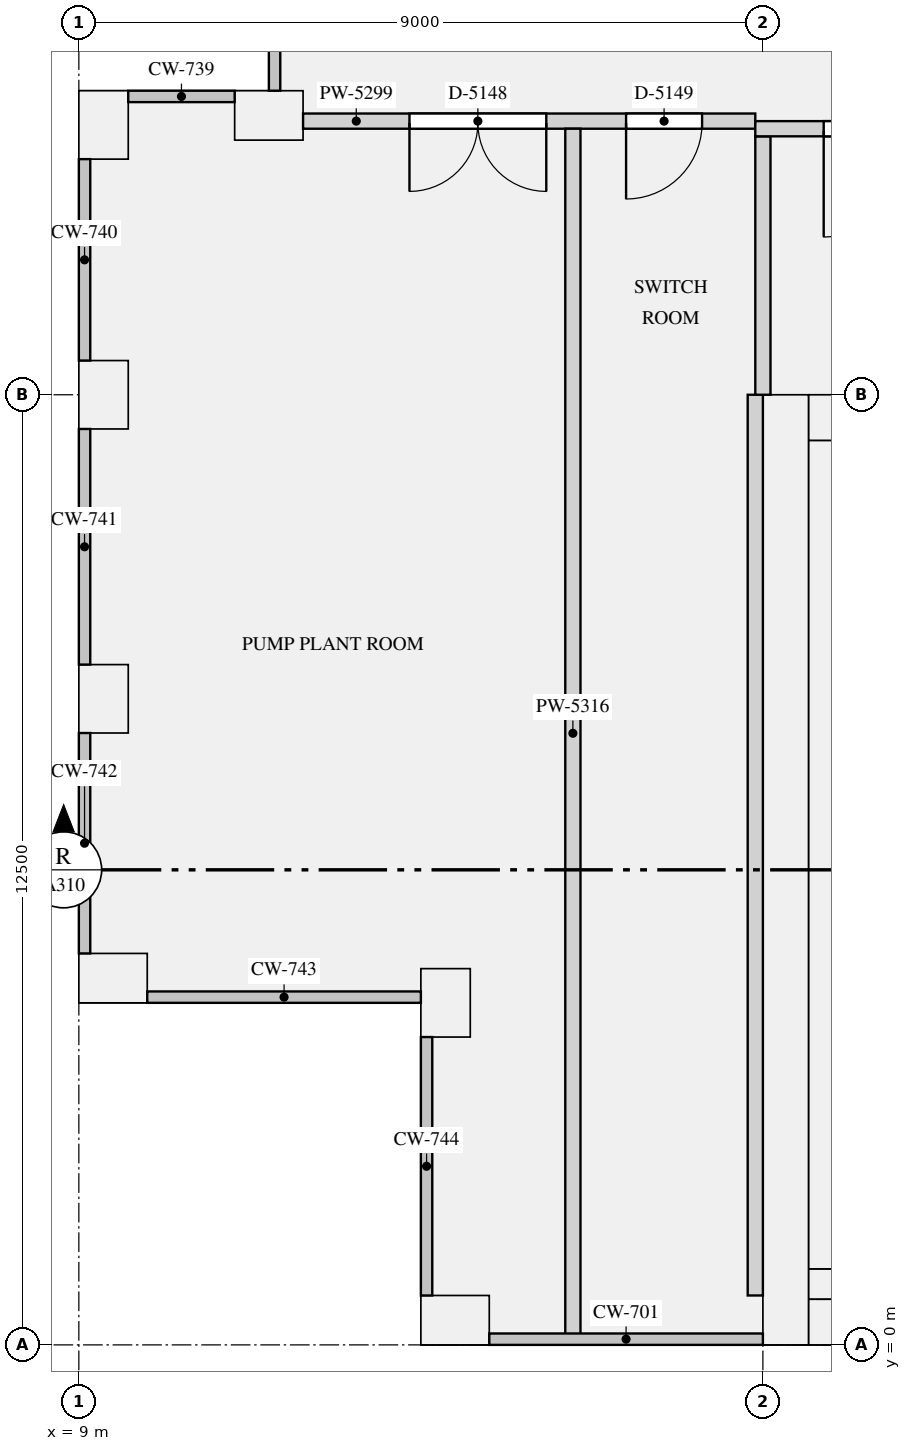
"""IFC4 building model, lengths in metres.
Left out: names, types, materials, properties, quantities, classifications, styles, units other than length and angle.
Written with IfcOpenShell. Run it as: python <this file> out.ifc"""

import sys

from ifc_helpers import new_model, si_unit, direction, frame, frame_2d, origin, origin_2d, place, context, subcontext, project, spatial, rectangle, extrude, element, fill, save


model = new_model("IFC4")
c1 = context("Model", 3, precision=1e-05, world=origin(), true_north=direction((0.0, 1.0)))
c2 = subcontext(c1, "Body", "Model", "MODEL_VIEW")
j1 = project(units=[si_unit("LENGTHUNIT", "METRE"), si_unit("PLANEANGLEUNIT", "RADIAN")], contexts=[c1])
p1 = place(None, origin())
s1 = spatial("IfcSite", under=j1, at=p1, CompositionType="ELEMENT")
p2 = place(p1, origin())
s2 = spatial("IfcBuilding", under=s1, at=p2, CompositionType="ELEMENT")
p3 = place(p2, frame((0.0, 0.0, 235.8)))
s3 = spatial("IfcBuildingStorey", under=s2, at=p3, CompositionType="ELEMENT", Elevation=235.8)
for number, where, z_axis, x_axis in (
    (1, (13.95, 0.325, 0.0), (0.0, 0.0, 1.0), (1.0, 0.0, 0.0)),
    (2, (11.5, 16.175, 0.0), (0.0, 0.0, 1.0), (-1.0, 0.0, 0.0)),
    (3, (9.325, 16.05, 0.0), (0.0, 0.0, 1.0), (0.0, -1.0, 0.0)),
    (4, (9.325, 12.5, 0.0), (0.0, 0.0, 1.0), (0.0, -1.0, 0.0)),
    (5, (9.325, 8.5, 0.0), (0.0, 0.0, 1.0), (0.0, -1.0, 0.0)),
    (6, (9.45, 4.825, 0.0), (0.0, 0.0, 1.0), (1.0, 0.0, 0.0)),
    (7, (13.825, 4.5, 0.0), (0.0, 0.0, 1.0), (0.0, -1.0, 0.0)),
):
    element("IfcColumn", number, at=place(p3, frame(where, z_axis=z_axis, x_axis=x_axis)), inside=s3, PredefinedType="USERDEFINED", context=c2, shape_type="SweptSolid", body=[
        extrude(rectangle(XDim=0.9, YDim=0.65, at=origin_2d()), origin(), (0.0, 0.0, 1.0), 4.2),
    ])
p4 = place(p3, frame((18.3, 0.0, 0.0), z_axis=(0.0, 0.0, 1.0), x_axis=(0.0, 1.0, 0.0)))
e8 = element("IfcWall", 8, at=p4, inside=s3, PredefinedType="SHEAR", context=c2, shape_type="SweptSolid", body=[
    extrude(rectangle(XDim=12.5, YDim=0.6, at=frame_2d((6.25, 0.0))), origin(), (0.0, 0.0, 1.0), 4.2),
])
p5 = place(p3, frame((18.6, 0.3, 0.0), z_axis=(0.0, 0.0, 1.0), x_axis=(1.0, 0.0, 0.0)))
e9 = element("IfcWall", 9, at=p5, inside=s3, PredefinedType="SHEAR", context=c2, shape_type="SweptSolid", body=[
    extrude(rectangle(XDim=34.8, YDim=0.6, at=frame_2d((17.4, 0.0))), origin(), (0.0, 0.0, 1.0), 4.2),
])
p6 = place(p3, frame((18.6, 12.2, 0.0), z_axis=(0.0, 0.0, 1.0), x_axis=(1.0, 0.0, 0.0)))
e10 = element("IfcWall", 10, at=p6, inside=s3, PredefinedType="SHEAR", context=c2, shape_type="SweptSolid", body=[
    extrude(rectangle(XDim=34.8, YDim=0.6, at=frame_2d((17.4, 0.0))), origin(), (0.0, 0.0, 1.0), 4.2),
])
p7 = place(p6, frame((24.575, 0.0, 0.0)))
e11 = element("IfcOpeningElement", 11, at=p7, cuts=e10, PredefinedType="OPENING", context=c2, shape_type="SweptSolid", body=[
    extrude(rectangle(XDim=1.1, YDim=2.1, at=frame_2d((0.55, 1.05))), frame((0.0, 0.31, 0.0), z_axis=(0.0, -1.0, 0.0), x_axis=(1.0, 0.0, 0.0)), (0.0, 0.0, 1.0), 0.62),
])
p8 = place(p6, frame((26.825, 0.0, 0.0)))
e12 = element("IfcOpeningElement", 12, at=p8, cuts=e10, PredefinedType="OPENING", context=c2, shape_type="SweptSolid", body=[
    extrude(rectangle(XDim=1.1, YDim=2.1, at=frame_2d((0.55, 1.05))), frame((0.0, 0.31, 0.0), z_axis=(0.0, -1.0, 0.0), x_axis=(1.0, 0.0, 0.0)), (0.0, 0.0, 1.0), 0.62),
])
p9 = place(p6, frame((29.075, 0.0, 0.0)))
e13 = element("IfcOpeningElement", 13, at=p9, cuts=e10, PredefinedType="OPENING", context=c2, shape_type="SweptSolid", body=[
    extrude(rectangle(XDim=1.1, YDim=2.1, at=frame_2d((0.55, 1.05))), frame((0.0, 0.31, 0.0), z_axis=(0.0, -1.0, 0.0), x_axis=(1.0, 0.0, 0.0)), (0.0, 0.0, 1.0), 0.62),
])
p10 = place(p6, frame((18.6, 0.0, 0.0)))
e14 = element("IfcOpeningElement", 14, at=p10, cuts=e10, PredefinedType="OPENING", context=c2, shape_type="SweptSolid", body=[
    extrude(rectangle(XDim=0.9, YDim=2.1, at=frame_2d((0.45, 1.05))), frame((0.0, 0.31, 0.0), z_axis=(0.0, -1.0, 0.0), x_axis=(1.0, 0.0, 0.0)), (0.0, 0.0, 1.0), 0.62),
])
p11 = place(p6, frame((4.65, 0.0, 0.0)))
e15 = element("IfcOpeningElement", 15, at=p11, cuts=e10, PredefinedType="OPENING", context=c2, shape_type="SweptSolid", body=[
    extrude(rectangle(XDim=0.9, YDim=2.1, at=frame_2d((0.45, 1.05))), frame((0.0, 0.31, 0.0), z_axis=(0.0, -1.0, 0.0), x_axis=(1.0, 0.0, 0.0)), (0.0, 0.0, 1.0), 0.62),
])
p12 = place(p6, frame((1.55, 0.0, 0.0)))
e16 = element("IfcOpeningElement", 16, at=p12, cuts=e10, PredefinedType="OPENING", context=c2, shape_type="SweptSolid", body=[
    extrude(rectangle(XDim=1.2, YDim=2.1, at=frame_2d((0.6, 1.05))), frame((0.0, 0.31, 0.0), z_axis=(0.0, -1.0, 0.0), x_axis=(1.0, 0.0, 0.0)), (0.0, 0.0, 1.0), 0.62),
])
p13 = place(p6, frame((32.05, 0.0, 0.0)))
e17 = element("IfcOpeningElement", 17, at=p13, cuts=e10, PredefinedType="OPENING", context=c2, shape_type="SweptSolid", body=[
    extrude(rectangle(XDim=1.2, YDim=2.1, at=frame_2d((0.6, 1.05))), frame((0.0, 0.31, 0.0), z_axis=(0.0, -1.0, 0.0), x_axis=(1.0, 0.0, 0.0)), (0.0, 0.0, 1.0), 0.62),
])
p14 = place(p3, frame((18.8, 1.0, 0.0), z_axis=(0.0, 0.0, 1.0), x_axis=(0.0, 1.0, 0.0)))
e18 = element("IfcWall", 18, at=p14, inside=s3, PredefinedType="SHEAR", context=c2, shape_type="SweptSolid", body=[
    extrude(rectangle(XDim=10.9, YDim=0.4, at=frame_2d((5.45, 0.0))), origin(), (0.0, 0.0, 1.0), 4.2),
])
p15 = place(p3, frame((18.6, 0.8, 0.0), z_axis=(0.0, 0.0, 1.0), x_axis=(1.0, 0.0, 0.0)))
e19 = element("IfcWall", 19, at=p15, inside=s3, PredefinedType="SHEAR", context=c2, shape_type="SweptSolid", body=[
    extrude(rectangle(XDim=34.8, YDim=0.4, at=frame_2d((17.4, 0.0))), origin(), (0.0, 0.0, 1.0), 4.2),
])
p16 = place(p3, frame((18.0, 12.5, 0.0), z_axis=(0.0, 0.0, 1.0), x_axis=(0.0, 1.0, 0.0)))
e20 = element("IfcWall", 20, at=p16, inside=s3, PredefinedType="PARTITIONING", context=c2, shape_type="SweptSolid", body=[
    extrude(rectangle(XDim=3.4, YDim=0.2, at=frame_2d((1.7, 0.0))), origin(), (0.0, 0.0, 1.0), 3.85),
])
p17 = place(p3, frame((17.9, 16.0, 0.0), z_axis=(0.0, 0.0, 1.0), x_axis=(1.0, 0.0, 0.0)))
e21 = element("IfcWall", 21, at=p17, inside=s3, PredefinedType="PARTITIONING", context=c2, shape_type="SweptSolid", body=[
    extrude(rectangle(XDim=36.2, YDim=0.2, at=frame_2d((18.1, 0.0))), origin(), (0.0, 0.0, 1.0), 3.85),
])
p18 = place(p17, frame((0.9, 0.0, 0.0)))
e22 = element("IfcOpeningElement", 22, at=p18, cuts=e21, PredefinedType="OPENING", context=c2, shape_type="SweptSolid", body=[
    extrude(rectangle(XDim=1.4, YDim=2.1, at=frame_2d((0.7, 1.05))), frame((0.0, 0.11, 0.0), z_axis=(0.0, -1.0, 0.0), x_axis=(1.0, 0.0, 0.0)), (0.0, 0.0, 1.0), 0.22),
])
p19 = place(p17, frame((33.9, 0.0, 0.0)))
e23 = element("IfcOpeningElement", 23, at=p19, cuts=e21, PredefinedType="OPENING", context=c2, shape_type="SweptSolid", body=[
    extrude(rectangle(XDim=1.4, YDim=2.1, at=frame_2d((0.7, 1.05))), frame((0.0, 0.11, 0.0), z_axis=(0.0, -1.0, 0.0), x_axis=(1.0, 0.0, 0.0)), (0.0, 0.0, 1.0), 0.22),
])
p20 = place(p3, frame((11.95, 16.1, 0.0), z_axis=(0.0, 0.0, 1.0), x_axis=(1.0, 0.0, 0.0)))
e24 = element("IfcWall", 24, at=p20, inside=s3, PredefinedType="PARTITIONING", context=c2, shape_type="SweptSolid", body=[
    extrude(rectangle(XDim=5.95, YDim=0.2, at=frame_2d((2.975, 0.0))), origin(), (0.0, 0.0, 1.0), 3.85),
])
p21 = place(p20, frame((1.4, 0.0, 0.0)))
e25 = element("IfcOpeningElement", 25, at=p21, cuts=e24, PredefinedType="OPENING", context=c2, shape_type="SweptSolid", body=[
    extrude(rectangle(XDim=1.8, YDim=2.1, at=frame_2d((0.9, 1.05))), frame((0.0, 0.11, 0.0), z_axis=(0.0, -1.0, 0.0), x_axis=(1.0, 0.0, 0.0)), (0.0, 0.0, 1.0), 0.22),
])
p22 = place(p20, frame((4.25, 0.0, 0.0)))
e26 = element("IfcOpeningElement", 26, at=p22, cuts=e24, PredefinedType="OPENING", context=c2, shape_type="SweptSolid", body=[
    extrude(rectangle(XDim=1.0, YDim=2.1, at=frame_2d((0.5, 1.05))), frame((0.0, 0.11, 0.0), z_axis=(0.0, -1.0, 0.0), x_axis=(1.0, 0.0, 0.0)), (0.0, 0.0, 1.0), 0.22),
])
p23 = place(p3, frame((15.5, 0.093, 0.0), z_axis=(0.0, 0.0, 1.0), x_axis=(0.0, 1.0, 0.0)))
e27 = element("IfcWall", 27, at=p23, inside=s3, PredefinedType="PARTITIONING", context=c2, shape_type="SweptSolid", body=[
    extrude(rectangle(XDim=15.907, YDim=0.2, at=frame_2d((7.954, 0.0))), origin(), (0.0, 0.0, 1.0), 3.85),
])
p24 = place(p3, frame((17.9, 0.65, 0.0), z_axis=(0.0, 0.0, 1.0), x_axis=(0.0, 1.0, 0.0)))
e28 = element("IfcWall", 28, at=p24, inside=s3, PredefinedType="PARTITIONING", context=c2, shape_type="SweptSolid", body=[
    extrude(rectangle(XDim=11.85, YDim=0.2, at=frame_2d((5.925, 0.0))), origin(), (0.0, 0.0, 1.0), 3.85),
])
p25 = place(p18, frame((1.4, 0.0, 0.0), z_axis=(0.0, 0.0, 1.0), x_axis=(-1.0, 0.0, 0.0)))
e29 = element("IfcDoor", 29, at=p25, inside=s3, OperationType="SINGLE_SWING_RIGHT", PredefinedType="DOOR", context=c2, shape_type="SweptSolid", body=[
    extrude(rectangle(XDim=1.4, YDim=2.1, at=frame_2d((0.7, 1.05))), frame((0.0, 0.025, 0.0), z_axis=(0.0, -1.0, 0.0), x_axis=(1.0, 0.0, 0.0)), (0.0, 0.0, 1.0), 0.05),
])
fill(e22, e29)
p26 = place(p21, frame((1.8, 0.0, 0.0), z_axis=(0.0, 0.0, 1.0), x_axis=(-1.0, 0.0, 0.0)))
e30 = element("IfcDoor", 30, at=p26, inside=s3, OperationType="DOUBLE_DOOR_SINGLE_SWING", PredefinedType="DOOR", context=c2, shape_type="SweptSolid", body=[
    extrude(rectangle(XDim=1.8, YDim=2.1, at=frame_2d((0.9, 1.05))), frame((0.0, 0.025, 0.0), z_axis=(0.0, -1.0, 0.0), x_axis=(1.0, 0.0, 0.0)), (0.0, 0.0, 1.0), 0.05),
])
fill(e25, e30)
p27 = place(p22, frame((1.0, 0.0, 0.0), z_axis=(0.0, 0.0, 1.0), x_axis=(-1.0, 0.0, 0.0)))
e31 = element("IfcDoor", 31, at=p27, inside=s3, OperationType="SINGLE_SWING_RIGHT", PredefinedType="DOOR", context=c2, shape_type="SweptSolid", body=[
    extrude(rectangle(XDim=1.0, YDim=2.1, at=frame_2d((0.5, 1.05))), frame((0.0, 0.025, 0.0), z_axis=(0.0, -1.0, 0.0), x_axis=(1.0, 0.0, 0.0)), (0.0, 0.0, 1.0), 0.05),
])
fill(e26, e31)
save(model, sys.argv[1])
